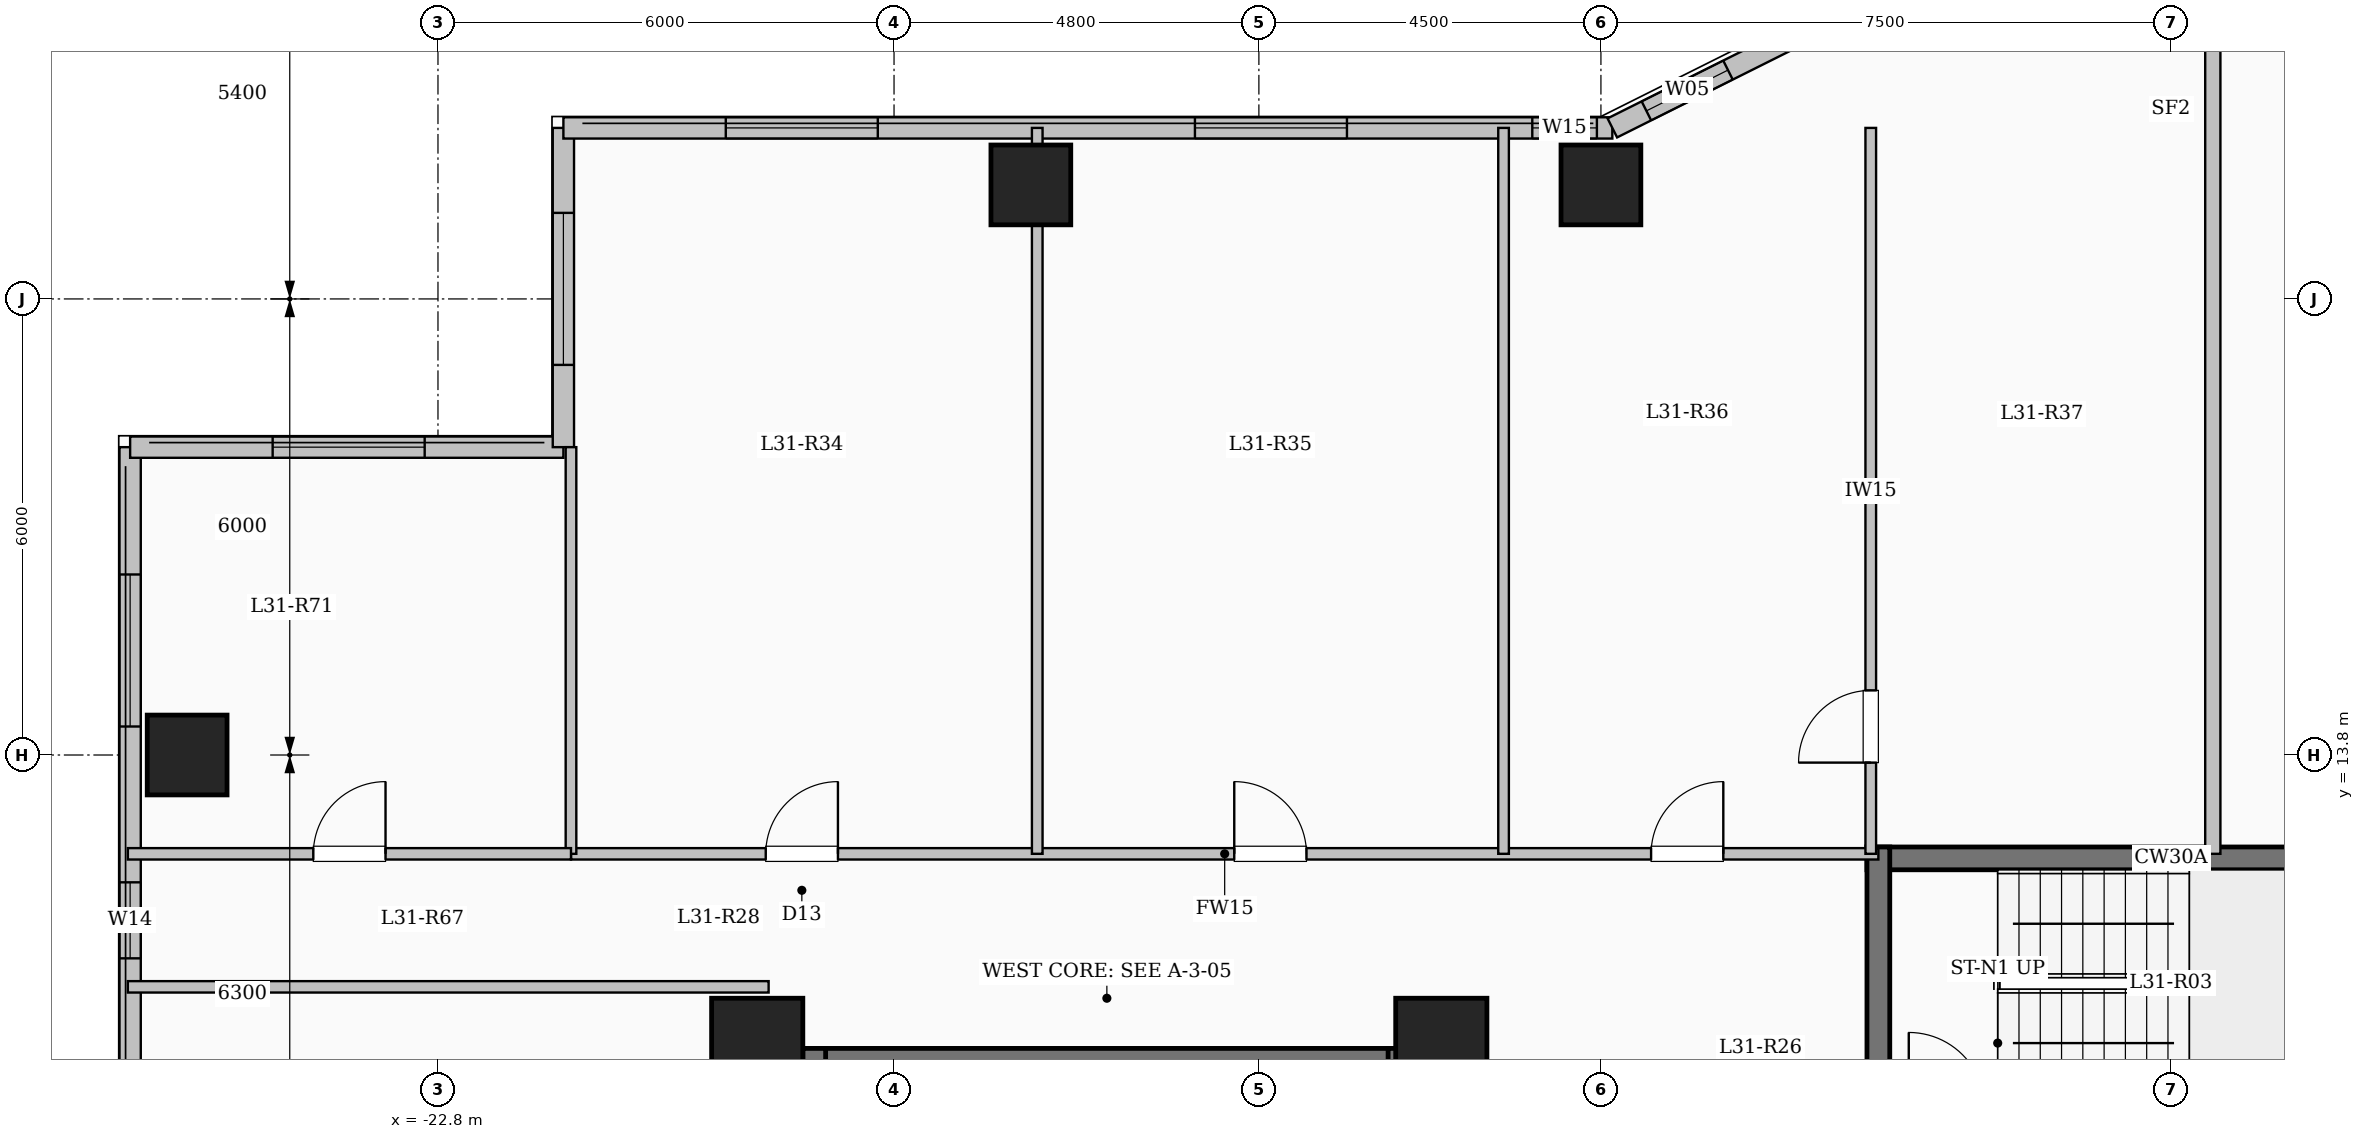
"""IFC4 building model, lengths in metres.
Left out: names, types, materials, properties, quantities, classifications, styles, units other than length and angle.
Written with IfcOpenShell. Run it as: python <this file> out.ifc"""

import sys

from ifc_helpers import new_model, si_unit, direction, frame, frame_2d, origin, origin_2d, place, context, subcontext, project, spatial, rectangle, extrude, element, fill, save


model = new_model("IFC4")
c1 = context("Model", 3, precision=1e-05, world=origin(), true_north=direction((0.0, 1.0)))
c2 = subcontext(c1, "Body", "Model", "MODEL_VIEW")
j1 = project(units=[si_unit("LENGTHUNIT", "METRE"), si_unit("PLANEANGLEUNIT", "RADIAN")], contexts=[c1])
p1 = place(None, origin())
s1 = spatial("IfcSite", under=j1, at=p1, CompositionType="ELEMENT")
p2 = place(p1, origin())
s2 = spatial("IfcBuilding", under=s1, at=p2, CompositionType="ELEMENT")
p3 = place(p2, frame((0.0, 0.0, 115.15)))
s3 = spatial("IfcBuildingStorey", under=s2, at=p3, CompositionType="ELEMENT", Elevation=115.15)
for number, where, z_axis, x_axis in (
    (1, (-9.6, 10.0, 0.0), (0.0, 0.0, 1.0), (1.0, 0.0, 0.0)),
    (2, (-18.6, 10.0, 0.0), (0.0, 0.0, 1.0), (1.0, 0.0, 0.0)),
):
    element("IfcColumn", number, at=place(p3, frame(where, z_axis=z_axis, x_axis=x_axis)), inside=s3, PredefinedType="COLUMN", context=c2, shape_type="SweptSolid", body=[
        extrude(rectangle(XDim=1.2, YDim=1.2, at=origin_2d()), origin(), (0.0, 0.0, 1.0), 3.35),
    ])
for number, where, z_axis, x_axis in (
    (3, (-15.0, 21.3, 0.0), (0.0, 0.0, 1.0), (1.0, 0.0, 0.0)),
    (4, (-7.5, 21.3, 0.0), (0.0, 0.0, 1.0), (1.0, 0.0, 0.0)),
    (5, (-26.1, 13.8, 0.0), (0.0, 0.0, 1.0), (1.0, 0.0, 0.0)),
):
    element("IfcColumn", number, at=place(p3, frame(where, z_axis=z_axis, x_axis=x_axis)), inside=s3, PredefinedType="COLUMN", context=c2, shape_type="SweptSolid", body=[
        extrude(rectangle(XDim=1.05, YDim=1.05, at=origin_2d()), origin(), (0.0, 0.0, 1.0), 3.35),
    ])
p4 = place(p3, frame((-26.85, -17.85, 0.0), z_axis=(0.0, 0.0, 1.0), x_axis=(0.0, 1.0, 0.0)))
e6 = element("IfcWall", 6, at=p4, inside=s3, PredefinedType="SOLIDWALL", context=c2, shape_type="SweptSolid", body=[
    extrude(rectangle(XDim=35.7, YDim=0.28, at=frame_2d((17.85, 0.0))), origin(), (0.0, 0.0, 1.0), 3.05),
])
p5 = place(p4, frame((2.55, 0.0, 0.9)))
e7 = element("IfcOpeningElement", 7, at=p5, cuts=e6, PredefinedType="OPENING", context=c2, shape_type="SweptSolid", body=[
    extrude(rectangle(XDim=2.4, YDim=1.8, at=frame_2d((1.2, 0.9))), frame((0.0, 0.15, 0.0), z_axis=(0.0, -1.0, 0.0), x_axis=(1.0, 0.0, 0.0)), (0.0, 0.0, 1.0), 0.3),
])
p6 = place(p4, frame((8.343, 0.0, 0.9)))
e8 = element("IfcOpeningElement", 8, at=p6, cuts=e6, PredefinedType="OPENING", context=c2, shape_type="SweptSolid", body=[
    extrude(rectangle(XDim=1.5, YDim=1.65, at=frame_2d((0.75, 0.825))), frame((0.0, 0.15, 0.0), z_axis=(0.0, -1.0, 0.0), x_axis=(1.0, 0.0, 0.0)), (0.0, 0.0, 1.0), 0.3),
])
p7 = place(p4, frame((18.6, 0.0, 0.9)))
e9 = element("IfcOpeningElement", 9, at=p7, cuts=e6, PredefinedType="OPENING", context=c2, shape_type="SweptSolid", body=[
    extrude(rectangle(XDim=2.0, YDim=1.7, at=frame_2d((1.0, 0.85))), frame((0.0, 0.15, 0.0), z_axis=(0.0, -1.0, 0.0), x_axis=(1.0, 0.0, 0.0)), (0.0, 0.0, 1.0), 0.3),
])
p8 = place(p4, frame((28.975, 0.0, 0.95)))
e10 = element("IfcOpeningElement", 10, at=p8, cuts=e6, PredefinedType="OPENING", context=c2, shape_type="SweptSolid", body=[
    extrude(rectangle(XDim=1.0, YDim=1.5, at=frame_2d((0.5, 0.75))), frame((0.0, 0.15, 0.0), z_axis=(0.0, -1.0, 0.0), x_axis=(1.0, 0.0, 0.0)), (0.0, 0.0, 1.0), 0.3),
])
p9 = place(p4, frame((32.025, 0.0, 0.9)))
e11 = element("IfcOpeningElement", 11, at=p9, cuts=e6, PredefinedType="OPENING", context=c2, shape_type="SweptSolid", body=[
    extrude(rectangle(XDim=2.0, YDim=1.7, at=frame_2d((1.0, 0.85))), frame((0.0, 0.15, 0.0), z_axis=(0.0, -1.0, 0.0), x_axis=(1.0, 0.0, 0.0)), (0.0, 0.0, 1.0), 0.3),
])
p10 = place(p3, frame((-26.85, 17.85, 0.0), z_axis=(0.0, 0.0, 1.0), x_axis=(1.0, 0.0, 0.0)))
e12 = element("IfcWall", 12, at=p10, inside=s3, PredefinedType="SOLIDWALL", context=c2, shape_type="SweptSolid", body=[
    extrude(rectangle(XDim=5.7, YDim=0.28, at=frame_2d((2.85, 0.0))), origin(), (0.0, 0.0, 1.0), 3.05),
])
p11 = place(p10, frame((1.875, 0.0, 0.9)))
e13 = element("IfcOpeningElement", 13, at=p11, cuts=e12, PredefinedType="OPENING", context=c2, shape_type="SweptSolid", body=[
    extrude(rectangle(XDim=2.0, YDim=1.7, at=frame_2d((1.0, 0.85))), frame((0.0, 0.15, 0.0), z_axis=(0.0, -1.0, 0.0), x_axis=(1.0, 0.0, 0.0)), (0.0, 0.0, 1.0), 0.3),
])
p12 = place(p3, frame((-21.15, 17.85, 0.0), z_axis=(0.0, 0.0, 1.0), x_axis=(0.0, 1.0, 0.0)))
e14 = element("IfcWall", 14, at=p12, inside=s3, PredefinedType="SOLIDWALL", context=c2, shape_type="SweptSolid", body=[
    extrude(rectangle(XDim=4.2, YDim=0.28, at=frame_2d((2.1, 0.0))), origin(), (0.0, 0.0, 1.0), 3.05),
])
p13 = place(p12, frame((1.082, 0.0, 0.9)))
e15 = element("IfcOpeningElement", 15, at=p13, cuts=e14, PredefinedType="OPENING", context=c2, shape_type="SweptSolid", body=[
    extrude(rectangle(XDim=2.0, YDim=1.7, at=frame_2d((1.0, 0.85))), frame((0.0, 0.15, 0.0), z_axis=(0.0, -1.0, 0.0), x_axis=(1.0, 0.0, 0.0)), (0.0, 0.0, 1.0), 0.3),
])
p14 = place(p3, frame((-21.15, 22.05, 0.0), z_axis=(0.0, 0.0, 1.0), x_axis=(1.0, 0.0, 0.0)))
e16 = element("IfcWall", 16, at=p14, inside=s3, PredefinedType="SOLIDWALL", context=c2, shape_type="SweptSolid", body=[
    extrude(rectangle(XDim=13.8, YDim=0.28, at=frame_2d((6.9, 0.0))), origin(), (0.0, 0.0, 1.0), 3.05),
])
p15 = place(p14, frame((2.136, 0.0, 0.9)))
e17 = element("IfcOpeningElement", 17, at=p15, cuts=e16, PredefinedType="OPENING", context=c2, shape_type="SweptSolid", body=[
    extrude(rectangle(XDim=2.0, YDim=1.7, at=frame_2d((1.0, 0.85))), frame((0.0, 0.15, 0.0), z_axis=(0.0, -1.0, 0.0), x_axis=(1.0, 0.0, 0.0)), (0.0, 0.0, 1.0), 0.3),
])
p16 = place(p14, frame((8.309, 0.0, 0.9)))
e18 = element("IfcOpeningElement", 18, at=p16, cuts=e16, PredefinedType="OPENING", context=c2, shape_type="SweptSolid", body=[
    extrude(rectangle(XDim=2.0, YDim=1.7, at=frame_2d((1.0, 0.85))), frame((0.0, 0.15, 0.0), z_axis=(0.0, -1.0, 0.0), x_axis=(1.0, 0.0, 0.0)), (0.0, 0.0, 1.0), 0.3),
])
p17 = place(p14, frame((12.747, 0.0, 0.95)))
e19 = element("IfcOpeningElement", 19, at=p17, cuts=e16, PredefinedType="OPENING", context=c2, shape_type="SweptSolid", body=[
    extrude(rectangle(XDim=0.85, YDim=1.5, at=frame_2d((0.425, 0.75))), frame((0.0, 0.15, 0.0), z_axis=(0.0, -1.0, 0.0), x_axis=(1.0, 0.0, 0.0)), (0.0, 0.0, 1.0), 0.3),
])
p18 = place(p3, frame((-7.35, 22.05, 0.0), z_axis=(0.0, 0.0, 1.0), x_axis=(0.894427191, 0.4472135955, 0.0)))
e20 = element("IfcWall", 20, at=p18, inside=s3, PredefinedType="SOLIDWALL", context=c2, shape_type="SweptSolid", body=[
    extrude(rectangle(XDim=3.354, YDim=0.28, at=frame_2d((1.677, 0.0))), origin(), (0.0, 0.0, 1.0), 3.05),
])
p19 = place(p18, frame((0.501, 0.0, 0.95)))
e21 = element("IfcOpeningElement", 21, at=p19, cuts=e20, PredefinedType="OPENING", context=c2, shape_type="SweptSolid", body=[
    extrude(rectangle(XDim=1.2, YDim=1.5, at=frame_2d((0.6, 0.75))), frame((0.0, 0.15, 0.0), z_axis=(0.0, -1.0, 0.0), x_axis=(1.0, 0.0, 0.0)), (0.0, 0.0, 1.0), 0.3),
])
p20 = place(p3, frame((-18.0, 9.79, 0.0), z_axis=(0.0, 0.0, 1.0), x_axis=(1.0, 0.0, 0.0)))
e22 = element("IfcWall", 22, at=p20, inside=s3, PredefinedType="SHEAR", context=c2, shape_type="SweptSolid", body=[
    extrude(rectangle(XDim=8.0, YDim=0.3, at=frame_2d((4.0, 0.0))), origin(), (0.0, 0.0, 1.0), 3.35),
])
for number, where, z_axis, x_axis in (
    (23, (-17.85, 6.35, 0.0), (0.0, 0.0, 1.0), (0.0, 1.0, 0.0)),
    (24, (-10.15, 6.35, 0.0), (0.0, 0.0, 1.0), (0.0, 1.0, 0.0)),
):
    element("IfcWall", number, at=place(p3, frame(where, z_axis=z_axis, x_axis=x_axis)), inside=s3, PredefinedType="SHEAR", context=c2, shape_type="SweptSolid", body=[
        extrude(rectangle(XDim=3.59, YDim=0.3, at=frame_2d((1.795, 0.0))), origin(), (0.0, 0.0, 1.0), 3.35),
    ])
p21 = place(p3, frame((-4.0, 12.44, 0.0), z_axis=(0.0, 0.0, 1.0), x_axis=(1.0, 0.0, 0.0)))
e25 = element("IfcWall", 25, at=p21, inside=s3, PredefinedType="SHEAR", context=c2, shape_type="SweptSolid", body=[
    extrude(rectangle(XDim=8.0, YDim=0.3, at=frame_2d((4.0, 0.0))), origin(), (0.0, 0.0, 1.0), 3.35),
])
p22 = place(p3, frame((-3.85, 9.0, 0.0), z_axis=(0.0, 0.0, 1.0), x_axis=(0.0, 1.0, 0.0)))
e26 = element("IfcWall", 26, at=p22, inside=s3, PredefinedType="SHEAR", context=c2, shape_type="SweptSolid", body=[
    extrude(rectangle(XDim=3.59, YDim=0.3, at=frame_2d((1.795, 0.0))), origin(), (0.0, 0.0, 1.0), 3.35),
])
p23 = place(p3, frame((-21.05, 12.5, 0.0), z_axis=(0.0, 0.0, 1.0), x_axis=(1.0, 0.0, 0.0)))
e27 = element("IfcWall", 27, at=p23, inside=s3, PredefinedType="PARTITIONING", context=c2, shape_type="SweptSolid", body=[
    extrude(rectangle(XDim=17.2, YDim=0.15, at=frame_2d((8.6, 0.0))), origin(), (0.0, 0.0, 1.0), 3.05),
])
p24 = place(p23, frame((2.562, 0.0, 0.0)))
e28 = element("IfcOpeningElement", 28, at=p24, cuts=e27, PredefinedType="OPENING", context=c2, shape_type="SweptSolid", body=[
    extrude(rectangle(XDim=0.95, YDim=2.15, at=frame_2d((0.475, 1.075))), frame((0.0, 0.085, 0.0), z_axis=(0.0, -1.0, 0.0), x_axis=(1.0, 0.0, 0.0)), (0.0, 0.0, 1.0), 0.17),
])
p25 = place(p23, frame((8.726, 0.0, 0.0)))
e29 = element("IfcOpeningElement", 29, at=p25, cuts=e27, PredefinedType="OPENING", context=c2, shape_type="SweptSolid", body=[
    extrude(rectangle(XDim=0.95, YDim=2.15, at=frame_2d((0.475, 1.075))), frame((0.0, 0.085, 0.0), z_axis=(0.0, -1.0, 0.0), x_axis=(1.0, 0.0, 0.0)), (0.0, 0.0, 1.0), 0.17),
])
p26 = place(p23, frame((14.21, 0.0, 0.0)))
e30 = element("IfcOpeningElement", 30, at=p26, cuts=e27, PredefinedType="OPENING", context=c2, shape_type="SweptSolid", body=[
    extrude(rectangle(XDim=0.95, YDim=2.15, at=frame_2d((0.475, 1.075))), frame((0.0, 0.085, 0.0), z_axis=(0.0, -1.0, 0.0), x_axis=(1.0, 0.0, 0.0)), (0.0, 0.0, 1.0), 0.17),
])
p27 = place(p3, frame((0.55, 12.5, 0.0), z_axis=(0.0, 0.0, 1.0), x_axis=(0.0, 1.0, 0.0)))
e31 = element("IfcWall", 31, at=p27, inside=s3, PredefinedType="SOLIDWALL", context=c2, shape_type="SweptSolid", body=[
    extrude(rectangle(XDim=11.08, YDim=0.2, at=frame_2d((5.54, 0.0))), origin(), (0.0, 0.0, 1.0), 3.05),
])
p28 = place(p3, frame((-3.95, 12.5, 0.0), z_axis=(0.0, 0.0, 1.0), x_axis=(0.0, 1.0, 0.0)))
e32 = element("IfcWall", 32, at=p28, inside=s3, PredefinedType="PARTITIONING", context=c2, shape_type="SweptSolid", body=[
    extrude(rectangle(XDim=9.55, YDim=0.14, at=frame_2d((4.775, 0.0))), origin(), (0.0, 0.0, 1.0), 3.05),
])
p29 = place(p28, frame((1.2, 0.0, 0.0)))
e33 = element("IfcOpeningElement", 33, at=p29, cuts=e32, PredefinedType="OPENING", context=c2, shape_type="SweptSolid", body=[
    extrude(rectangle(XDim=0.95, YDim=2.15, at=frame_2d((0.475, 1.075))), frame((0.0, 0.08, 0.0), z_axis=(0.0, -1.0, 0.0), x_axis=(1.0, 0.0, 0.0)), (0.0, 0.0, 1.0), 0.16),
])
p30 = place(p3, frame((-14.916, 12.5, 0.0), z_axis=(0.0, 0.0, 1.0), x_axis=(0.0, 1.0, 0.0)))
e34 = element("IfcWall", 34, at=p30, inside=s3, PredefinedType="PARTITIONING", context=c2, shape_type="SweptSolid", body=[
    extrude(rectangle(XDim=9.55, YDim=0.14, at=frame_2d((4.775, 0.0))), origin(), (0.0, 0.0, 1.0), 2.385),
])
p31 = place(p3, frame((-8.781, 12.5, 0.0), z_axis=(0.0, 0.0, 1.0), x_axis=(0.0, 1.0, 0.0)))
e35 = element("IfcWall", 35, at=p31, inside=s3, PredefinedType="PARTITIONING", context=c2, shape_type="SweptSolid", body=[
    extrude(rectangle(XDim=9.55, YDim=0.14, at=frame_2d((4.775, 0.0))), origin(), (0.0, 0.0, 1.0), 3.05),
])
p32 = place(p3, frame((-26.88, 10.75, 0.0), z_axis=(0.0, 0.0, 1.0), x_axis=(1.0, 0.0, 0.0)))
e36 = element("IfcWall", 36, at=p32, inside=s3, PredefinedType="PARTITIONING", context=c2, shape_type="SweptSolid", body=[
    extrude(rectangle(XDim=8.43, YDim=0.15, at=frame_2d((4.215, 0.0))), origin(), (0.0, 0.0, 1.0), 3.05),
])
p33 = place(p3, frame((-21.05, 12.5, 0.0), z_axis=(0.0, 0.0, 1.0), x_axis=(0.0, 1.0, 0.0)))
e37 = element("IfcWall", 37, at=p33, inside=s3, PredefinedType="PARTITIONING", context=c2, shape_type="SweptSolid", body=[
    extrude(rectangle(XDim=5.35, YDim=0.14, at=frame_2d((2.675, 0.0))), origin(), (0.0, 0.0, 1.0), 3.05),
])
p34 = place(p3, frame((-26.88, 12.5, 0.0), z_axis=(0.0, 0.0, 1.0), x_axis=(1.0, 0.0, 0.0)))
e38 = element("IfcWall", 38, at=p34, inside=s3, PredefinedType="PARTITIONING", context=c2, shape_type="SweptSolid", body=[
    extrude(rectangle(XDim=5.83, YDim=0.15, at=frame_2d((2.915, 0.0))), origin(), (0.0, 0.0, 1.0), 3.05),
])
p35 = place(p34, frame((2.44, 0.0, 0.0)))
e39 = element("IfcOpeningElement", 39, at=p35, cuts=e38, PredefinedType="OPENING", context=c2, shape_type="SweptSolid", body=[
    extrude(rectangle(XDim=0.95, YDim=2.15, at=frame_2d((0.475, 1.075))), frame((0.0, 0.085, 0.0), z_axis=(0.0, -1.0, 0.0), x_axis=(1.0, 0.0, 0.0)), (0.0, 0.0, 1.0), 0.17),
])
p36 = place(p8, origin())
e40 = element("IfcWindow", 40, at=p36, inside=s3, PartitioningType="SINGLE_PANEL", PredefinedType="WINDOW", context=c2, shape_type="SweptSolid", body=[
    extrude(rectangle(XDim=1.0, YDim=1.5, at=frame_2d((0.5, 0.75))), frame((0.0, 0.03, 0.0), z_axis=(0.0, -1.0, 0.0), x_axis=(1.0, 0.0, 0.0)), (0.0, 0.0, 1.0), 0.06),
])
fill(e10, e40)
p37 = place(p9, origin())
e41 = element("IfcWindow", 41, at=p37, inside=s3, PartitioningType="SINGLE_PANEL", PredefinedType="WINDOW", context=c2, shape_type="SweptSolid", body=[
    extrude(rectangle(XDim=2.0, YDim=1.7, at=frame_2d((1.0, 0.85))), frame((0.0, 0.03, 0.0), z_axis=(0.0, -1.0, 0.0), x_axis=(1.0, 0.0, 0.0)), (0.0, 0.0, 1.0), 0.06),
])
fill(e11, e41)
p38 = place(p11, origin())
e42 = element("IfcWindow", 42, at=p38, inside=s3, PartitioningType="SINGLE_PANEL", PredefinedType="WINDOW", context=c2, shape_type="SweptSolid", body=[
    extrude(rectangle(XDim=2.0, YDim=1.7, at=frame_2d((1.0, 0.85))), frame((0.0, 0.03, 0.0), z_axis=(0.0, -1.0, 0.0), x_axis=(1.0, 0.0, 0.0)), (0.0, 0.0, 1.0), 0.06),
])
fill(e13, e42)
p39 = place(p13, origin())
e43 = element("IfcWindow", 43, at=p39, inside=s3, PartitioningType="SINGLE_PANEL", PredefinedType="WINDOW", context=c2, shape_type="SweptSolid", body=[
    extrude(rectangle(XDim=2.0, YDim=1.7, at=frame_2d((1.0, 0.85))), frame((0.0, 0.03, 0.0), z_axis=(0.0, -1.0, 0.0), x_axis=(1.0, 0.0, 0.0)), (0.0, 0.0, 1.0), 0.06),
])
fill(e15, e43)
p40 = place(p15, origin())
e44 = element("IfcWindow", 44, at=p40, inside=s3, PartitioningType="SINGLE_PANEL", PredefinedType="WINDOW", context=c2, shape_type="SweptSolid", body=[
    extrude(rectangle(XDim=2.0, YDim=1.7, at=frame_2d((1.0, 0.85))), frame((0.0, 0.03, 0.0), z_axis=(0.0, -1.0, 0.0), x_axis=(1.0, 0.0, 0.0)), (0.0, 0.0, 1.0), 0.06),
])
fill(e17, e44)
p41 = place(p16, origin())
e45 = element("IfcWindow", 45, at=p41, inside=s3, PartitioningType="SINGLE_PANEL", PredefinedType="WINDOW", context=c2, shape_type="SweptSolid", body=[
    extrude(rectangle(XDim=2.0, YDim=1.7, at=frame_2d((1.0, 0.85))), frame((0.0, 0.03, 0.0), z_axis=(0.0, -1.0, 0.0), x_axis=(1.0, 0.0, 0.0)), (0.0, 0.0, 1.0), 0.06),
])
fill(e18, e45)
p42 = place(p17, origin())
e46 = element("IfcWindow", 46, at=p42, inside=s3, PartitioningType="SINGLE_PANEL", PredefinedType="WINDOW", context=c2, shape_type="SweptSolid", body=[
    extrude(rectangle(XDim=0.85, YDim=1.5, at=frame_2d((0.425, 0.75))), frame((0.0, 0.03, 0.0), z_axis=(0.0, -1.0, 0.0), x_axis=(1.0, 0.0, 0.0)), (0.0, 0.0, 1.0), 0.06),
])
fill(e19, e46)
p43 = place(p19, origin())
e47 = element("IfcWindow", 47, at=p43, inside=s3, PartitioningType="SINGLE_PANEL", PredefinedType="WINDOW", context=c2, shape_type="SweptSolid", body=[
    extrude(rectangle(XDim=1.2, YDim=1.5, at=frame_2d((0.6, 0.75))), frame((0.0, 0.03, 0.0), z_axis=(0.0, -1.0, 0.0), x_axis=(1.0, 0.0, 0.0)), (0.0, 0.0, 1.0), 0.06),
])
fill(e21, e47)
p44 = place(p24, origin())
e48 = element("IfcDoor", 48, at=p44, inside=s3, OperationType="SINGLE_SWING_RIGHT", PredefinedType="DOOR", context=c2, shape_type="SweptSolid", body=[
    extrude(rectangle(XDim=0.95, YDim=2.15, at=frame_2d((0.475, 1.075))), frame((0.0, 0.025, 0.0), z_axis=(0.0, -1.0, 0.0), x_axis=(1.0, 0.0, 0.0)), (0.0, 0.0, 1.0), 0.05),
])
fill(e28, e48)
p45 = place(p25, origin())
e49 = element("IfcDoor", 49, at=p45, inside=s3, OperationType="SINGLE_SWING_LEFT", PredefinedType="DOOR", context=c2, shape_type="SweptSolid", body=[
    extrude(rectangle(XDim=0.95, YDim=2.15, at=frame_2d((0.475, 1.075))), frame((0.0, 0.025, 0.0), z_axis=(0.0, -1.0, 0.0), x_axis=(1.0, 0.0, 0.0)), (0.0, 0.0, 1.0), 0.05),
])
fill(e29, e49)
p46 = place(p26, origin())
e50 = element("IfcDoor", 50, at=p46, inside=s3, OperationType="SINGLE_SWING_RIGHT", PredefinedType="DOOR", context=c2, shape_type="SweptSolid", body=[
    extrude(rectangle(XDim=0.95, YDim=2.15, at=frame_2d((0.475, 1.075))), frame((0.0, 0.025, 0.0), z_axis=(0.0, -1.0, 0.0), x_axis=(1.0, 0.0, 0.0)), (0.0, 0.0, 1.0), 0.05),
])
fill(e30, e50)
p47 = place(p29, origin())
e51 = element("IfcDoor", 51, at=p47, inside=s3, OperationType="SINGLE_SWING_LEFT", PredefinedType="DOOR", context=c2, shape_type="SweptSolid", body=[
    extrude(rectangle(XDim=0.95, YDim=2.15, at=frame_2d((0.475, 1.075))), frame((0.0, 0.025, 0.0), z_axis=(0.0, -1.0, 0.0), x_axis=(1.0, 0.0, 0.0)), (0.0, 0.0, 1.0), 0.05),
])
fill(e33, e51)
p48 = place(p35, origin())
e52 = element("IfcDoor", 52, at=p48, inside=s3, OperationType="SINGLE_SWING_RIGHT", PredefinedType="DOOR", context=c2, shape_type="SweptSolid", body=[
    extrude(rectangle(XDim=0.95, YDim=2.15, at=frame_2d((0.475, 1.075))), frame((0.0, 0.025, 0.0), z_axis=(0.0, -1.0, 0.0), x_axis=(1.0, 0.0, 0.0)), (0.0, 0.0, 1.0), 0.05),
])
fill(e39, e52)
save(model, sys.argv[1])
